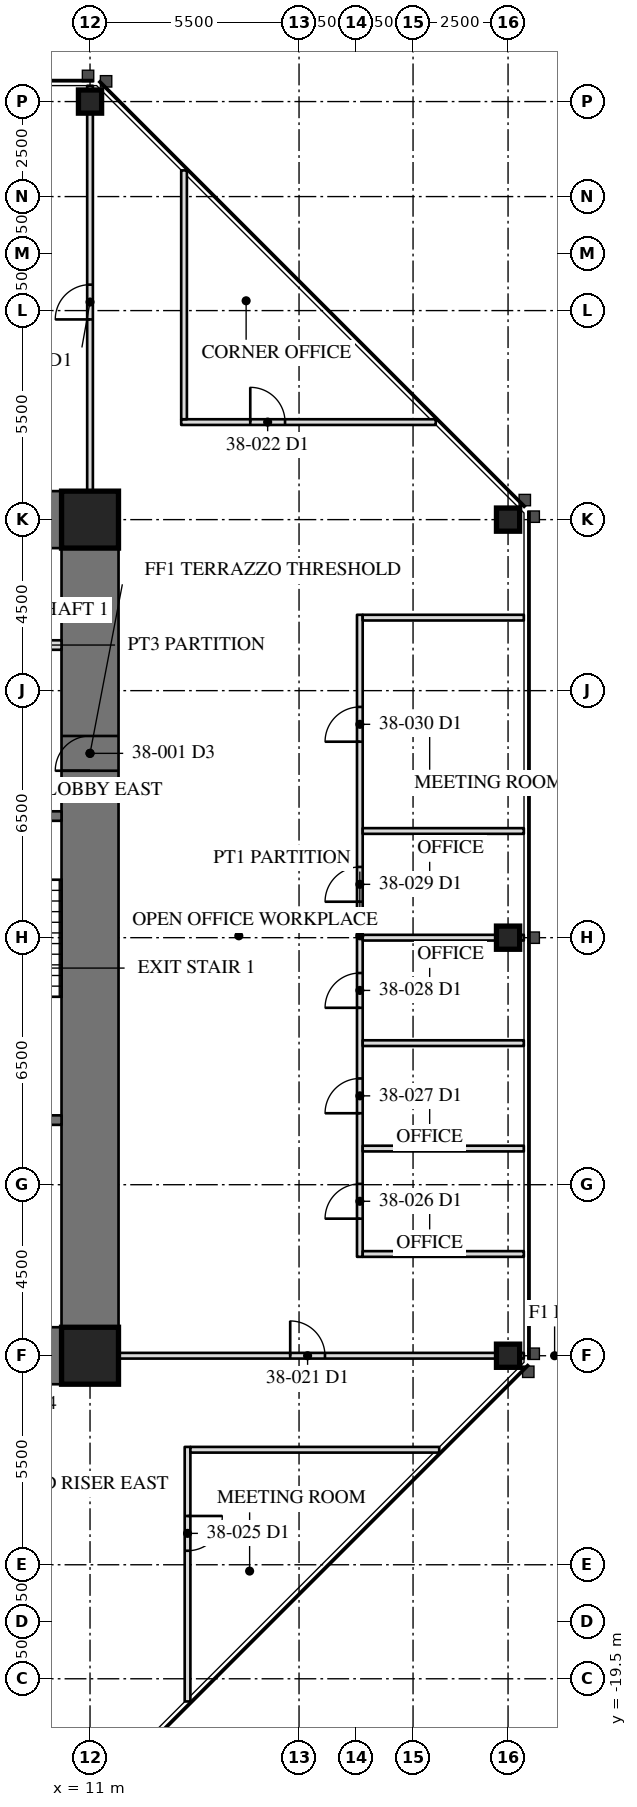
"""IFC4 building model, lengths in metres.
Left out: names, types, materials, properties, quantities, classifications, styles, units other than length and angle.
Written with IfcOpenShell. Run it as: python <this file> out.ifc"""

import sys

from ifc_helpers import new_model, si_unit, direction, frame, frame_2d, origin, origin_2d, place, context, subcontext, project, spatial, rectangle, hollow_rectangle, extrude, element, fill, save


model = new_model("IFC4")
c1 = context("Model", 3, precision=1e-05, world=origin(), true_north=direction((0.0, 1.0)))
c2 = subcontext(c1, "Body", "Model", "MODEL_VIEW")
j1 = project(units=[si_unit("LENGTHUNIT", "METRE"), si_unit("PLANEANGLEUNIT", "RADIAN")], contexts=[c1])
p1 = place(None, origin())
s1 = spatial("IfcSite", under=j1, at=p1, CompositionType="ELEMENT")
p2 = place(p1, origin())
s2 = spatial("IfcBuilding", under=s1, at=p2, CompositionType="ELEMENT")
p3 = place(p2, frame((0.0, 0.0, 162.3)))
s3 = spatial("IfcBuildingStorey", under=s2, at=p3, CompositionType="ELEMENT", Elevation=162.3)
for number, where, z_axis, x_axis in (
    (1, (22.0, -11.0, 0.0), (0.0, 0.0, 1.0), (0.0, 1.0, 0.0)),
    (2, (22.0, 0.0, 0.0), (0.0, 0.0, 1.0), (0.0, 1.0, 0.0)),
    (3, (22.0, 11.0, 0.0), (0.0, 0.0, 1.0), (0.0, 1.0, 0.0)),
    (4, (11.0, 22.0, 0.0), (0.0, 0.0, 1.0), (1.0, 0.0, 0.0)),
):
    element("IfcColumn", number, at=place(p3, frame(where, z_axis=z_axis, x_axis=x_axis)), inside=s3, PredefinedType="COLUMN", context=c2, shape_type="SweptSolid", body=[
        extrude(hollow_rectangle(XDim=0.61, YDim=0.61, WallThickness=0.076, at=origin_2d()), origin(), (0.0, 0.0, 1.0), 4.1),
    ])
p4 = place(p3, frame((11.0, -11.0, 0.0), z_axis=(0.0, 0.0, 1.0), x_axis=(0.0, 1.0, 0.0)))
e5 = element("IfcWall", 5, at=p4, inside=s3, PredefinedType="SHEAR", context=c2, shape_type="SweptSolid", body=[
    extrude(rectangle(XDim=22.0, YDim=1.5, at=frame_2d((11.0, 0.0))), origin(), (0.0, 0.0, 1.0), 4.1),
])
p5 = place(p4, frame((15.393, 0.0, 0.0)))
e6 = element("IfcOpeningElement", 6, at=p5, cuts=e5, PredefinedType="OPENING", context=c2, shape_type="SweptSolid", body=[
    extrude(rectangle(XDim=0.915, YDim=2.134, at=frame_2d((0.458, 1.067))), frame((0.0, 0.76, 0.0), z_axis=(0.0, -1.0, 0.0), x_axis=(1.0, 0.0, 0.0)), (0.0, 0.0, 1.0), 1.52),
])
for number, where, z_axis, x_axis in (
    (7, (11.0, 11.0, 0.0), (0.0, 0.0, 1.0), (-1.0, 0.0, 0.0)),
    (8, (6.5, -11.0, 0.0), (0.0, 0.0, 1.0), (1.0, 0.0, 0.0)),
):
    element("IfcWall", number, at=place(p3, frame(where, z_axis=z_axis, x_axis=x_axis)), inside=s3, PredefinedType="SHEAR", context=c2, shape_type="SweptSolid", body=[
        extrude(rectangle(XDim=4.5, YDim=1.5, at=frame_2d((2.25, 0.0))), origin(), (0.0, 0.0, 1.0), 4.1),
    ])
for number, where, z_axis, x_axis in (
    (9, (11.0, 11.0, 0.0), (0.0, 0.0, 1.0), (1.0, 0.0, 0.0)),
    (10, (11.0, -11.0, 0.0), (0.0, 0.0, 1.0), (1.0, 0.0, 0.0)),
):
    element("IfcColumn", number, at=place(p3, frame(where, z_axis=z_axis, x_axis=x_axis)), inside=s3, PredefinedType="COLUMN", context=c2, shape_type="SweptSolid", body=[
        extrude(hollow_rectangle(XDim=1.499, YDim=1.499, WallThickness=0.102, at=origin_2d()), origin(), (0.0, 0.0, 1.0), 4.1),
    ])
p6 = place(p3, frame((6.95, -4.8, 0.0), z_axis=(0.0, 0.0, 1.0), x_axis=(1.0, 0.0, 0.0)))
e11 = element("IfcWall", 11, at=p6, inside=s3, PredefinedType="SOLIDWALL", context=c2, shape_type="SweptSolid", body=[
    extrude(rectangle(XDim=3.3, YDim=0.25, at=frame_2d((1.65, 0.0))), origin(), (0.0, 0.0, 1.0), 3.91),
])
p7 = place(p3, frame((6.95, 3.2, 0.0), z_axis=(0.0, 0.0, 1.0), x_axis=(1.0, 0.0, 0.0)))
e12 = element("IfcWall", 12, at=p7, inside=s3, PredefinedType="SOLIDWALL", context=c2, shape_type="SweptSolid", body=[
    extrude(rectangle(XDim=3.3, YDim=0.25, at=frame_2d((1.65, 0.0))), origin(), (0.0, 0.0, 1.0), 3.91),
])
p8 = place(p7, frame((1.116, 0.0, 0.0)))
e13 = element("IfcOpeningElement", 13, at=p8, cuts=e12, PredefinedType="OPENING", context=c2, shape_type="SweptSolid", body=[
    extrude(rectangle(XDim=1.067, YDim=2.134, at=frame_2d((0.533, 1.067))), frame((0.0, 0.135, 0.0), z_axis=(0.0, -1.0, 0.0), x_axis=(1.0, 0.0, 0.0)), (0.0, 0.0, 1.0), 0.27),
])
p9 = place(p3, frame((6.95, 7.7, 0.0), z_axis=(0.0, 0.0, 1.0), x_axis=(1.0, 0.0, 0.0)))
e14 = element("IfcWall", 14, at=p9, inside=s3, PredefinedType="PARTITIONING", context=c2, shape_type="SweptSolid", body=[
    extrude(rectangle(XDim=3.3, YDim=0.25, at=frame_2d((1.65, 0.0))), origin(), (0.0, 0.0, 1.0), 3.91),
])
p10 = place(p9, frame((0.45, 0.0, 0.0)))
e15 = element("IfcOpeningElement", 15, at=p10, cuts=e14, PredefinedType="OPENING", context=c2, shape_type="SweptSolid", body=[
    extrude(rectangle(XDim=1.219, YDim=2.134, at=frame_2d((0.609, 1.067))), frame((0.0, 0.135, 0.0), z_axis=(0.0, -1.0, 0.0), x_axis=(1.0, 0.0, 0.0)), (0.0, 0.0, 1.0), 0.27),
])
p11 = place(p3, frame((11.0, 11.75, 0.0), z_axis=(0.0, 0.0, 1.0), x_axis=(0.0, 1.0, 0.0)))
e16 = element("IfcWall", 16, at=p11, inside=s3, PredefinedType="PARTITIONING", context=c2, shape_type="SweptSolid", body=[
    extrude(rectangle(XDim=10.665, YDim=0.15, at=frame_2d((5.333, 0.0))), origin(), (0.0, 0.0, 1.0), 3.326),
])
p12 = place(p11, frame((4.518, 0.0, 0.0)))
e17 = element("IfcOpeningElement", 17, at=p12, cuts=e16, PredefinedType="OPENING", context=c2, shape_type="SweptSolid", body=[
    extrude(rectangle(XDim=0.915, YDim=2.134, at=frame_2d((0.458, 1.067))), frame((0.0, 0.085, 0.0), z_axis=(0.0, -1.0, 0.0), x_axis=(1.0, 0.0, 0.0)), (0.0, 0.0, 1.0), 0.17),
])
p13 = place(p3, frame((11.75, -11.0, 0.0), z_axis=(0.0, 0.0, 1.0), x_axis=(1.0, 0.0, 0.0)))
e18 = element("IfcWall", 18, at=p13, inside=s3, PredefinedType="PARTITIONING", context=c2, shape_type="SweptSolid", body=[
    extrude(rectangle(XDim=10.665, YDim=0.15, at=frame_2d((5.333, 0.0))), origin(), (0.0, 0.0, 1.0), 3.326),
])
p14 = place(p13, frame((4.518, 0.0, 0.0)))
e19 = element("IfcOpeningElement", 19, at=p14, cuts=e18, PredefinedType="OPENING", context=c2, shape_type="SweptSolid", body=[
    extrude(rectangle(XDim=0.915, YDim=2.134, at=frame_2d((0.458, 1.067))), frame((0.0, 0.085, 0.0), z_axis=(0.0, -1.0, 0.0), x_axis=(1.0, 0.0, 0.0)), (0.0, 0.0, 1.0), 0.17),
])
p15 = place(p3, frame((13.399, 13.566, 0.0), z_axis=(0.0, 0.0, 1.0), x_axis=(1.0, 0.0, 0.0)))
e20 = element("IfcWall", 20, at=p15, inside=s3, PredefinedType="PARTITIONING", context=c2, shape_type="SweptSolid", body=[
    extrude(rectangle(XDim=6.698, YDim=0.15, at=frame_2d((3.349, 0.0))), origin(), (0.0, 0.0, 1.0), 3.91),
])
p16 = place(p15, frame((1.817, 0.0, 0.0)))
e21 = element("IfcOpeningElement", 21, at=p16, cuts=e20, PredefinedType="OPENING", context=c2, shape_type="SweptSolid", body=[
    extrude(rectangle(XDim=0.915, YDim=2.134, at=frame_2d((0.458, 1.067))), frame((0.0, 0.085, 0.0), z_axis=(0.0, -1.0, 0.0), x_axis=(1.0, 0.0, 0.0)), (0.0, 0.0, 1.0), 0.17),
])
p17 = place(p3, frame((13.474, 13.641, 0.0), z_axis=(0.0, 0.0, 1.0), x_axis=(0.0, 1.0, 0.0)))
e22 = element("IfcWall", 22, at=p17, inside=s3, PredefinedType="PARTITIONING", context=c2, shape_type="SweptSolid", body=[
    extrude(rectangle(XDim=6.548, YDim=0.15, at=frame_2d((3.274, 0.0))), origin(), (0.0, 0.0, 1.0), 3.91),
])
p18 = place(p3, frame((13.566, -13.399, 0.0), z_axis=(0.0, 0.0, 1.0), x_axis=(0.0, -1.0, 0.0)))
e23 = element("IfcWall", 23, at=p18, inside=s3, PredefinedType="PARTITIONING", context=c2, shape_type="SweptSolid", body=[
    extrude(rectangle(XDim=6.698, YDim=0.15, at=frame_2d((3.349, 0.0))), origin(), (0.0, 0.0, 1.0), 3.91),
])
p19 = place(p18, frame((1.817, 0.0, 0.0)))
e24 = element("IfcOpeningElement", 24, at=p19, cuts=e23, PredefinedType="OPENING", context=c2, shape_type="SweptSolid", body=[
    extrude(rectangle(XDim=0.915, YDim=2.134, at=frame_2d((0.458, 1.067))), frame((0.0, 0.085, 0.0), z_axis=(0.0, -1.0, 0.0), x_axis=(1.0, 0.0, 0.0)), (0.0, 0.0, 1.0), 0.17),
])
p20 = place(p3, frame((13.641, -13.474, 0.0), z_axis=(0.0, 0.0, 1.0), x_axis=(1.0, 0.0, 0.0)))
e25 = element("IfcWall", 25, at=p20, inside=s3, PredefinedType="PARTITIONING", context=c2, shape_type="SweptSolid", body=[
    extrude(rectangle(XDim=6.548, YDim=0.15, at=frame_2d((3.274, 0.0))), origin(), (0.0, 0.0, 1.0), 3.91),
])
p21 = place(p3, frame((18.1, -8.398, 0.0), z_axis=(0.0, 0.0, 1.0), x_axis=(0.0, 1.0, 0.0)))
e26 = element("IfcWall", 26, at=p21, inside=s3, PredefinedType="PARTITIONING", context=c2, shape_type="SweptSolid", body=[
    extrude(rectangle(XDim=16.894, YDim=0.15, at=frame_2d((8.447, 0.0))), origin(), (0.0, 0.0, 1.0), 3.91),
])
p22 = place(p21, frame((1.004, 0.0, 0.0)))
e27 = element("IfcOpeningElement", 27, at=p22, cuts=e26, PredefinedType="OPENING", context=c2, shape_type="SweptSolid", body=[
    extrude(rectangle(XDim=0.915, YDim=2.134, at=frame_2d((0.458, 1.067))), frame((0.0, 0.085, 0.0), z_axis=(0.0, -1.0, 0.0), x_axis=(1.0, 0.0, 0.0)), (0.0, 0.0, 1.0), 0.17),
])
p23 = place(p21, frame((3.779, 0.0, 0.0)))
e28 = element("IfcOpeningElement", 28, at=p23, cuts=e26, PredefinedType="OPENING", context=c2, shape_type="SweptSolid", body=[
    extrude(rectangle(XDim=0.915, YDim=2.134, at=frame_2d((0.458, 1.067))), frame((0.0, 0.085, 0.0), z_axis=(0.0, -1.0, 0.0), x_axis=(1.0, 0.0, 0.0)), (0.0, 0.0, 1.0), 0.17),
])
p24 = place(p21, frame((6.553, 0.0, 0.0)))
e29 = element("IfcOpeningElement", 29, at=p24, cuts=e26, PredefinedType="OPENING", context=c2, shape_type="SweptSolid", body=[
    extrude(rectangle(XDim=0.915, YDim=2.134, at=frame_2d((0.458, 1.067))), frame((0.0, 0.085, 0.0), z_axis=(0.0, -1.0, 0.0), x_axis=(1.0, 0.0, 0.0)), (0.0, 0.0, 1.0), 0.17),
])
p25 = place(p21, frame((9.344, 0.0, 0.0)))
e30 = element("IfcOpeningElement", 30, at=p25, cuts=e26, PredefinedType="OPENING", context=c2, shape_type="SweptSolid", body=[
    extrude(rectangle(XDim=0.915, YDim=2.134, at=frame_2d((0.458, 1.067))), frame((0.0, 0.085, 0.0), z_axis=(0.0, -1.0, 0.0), x_axis=(1.0, 0.0, 0.0)), (0.0, 0.0, 1.0), 0.17),
])
p26 = place(p21, frame((13.554, 0.0, 0.0)))
e31 = element("IfcOpeningElement", 31, at=p26, cuts=e26, PredefinedType="OPENING", context=c2, shape_type="SweptSolid", body=[
    extrude(rectangle(XDim=0.915, YDim=2.134, at=frame_2d((0.458, 1.067))), frame((0.0, 0.085, 0.0), z_axis=(0.0, -1.0, 0.0), x_axis=(1.0, 0.0, 0.0)), (0.0, 0.0, 1.0), 0.17),
])
for number, where, z_axis, x_axis in (
    (32, (18.175, -8.323, 0.0), (0.0, 0.0, 1.0), (1.0, 0.0, 0.0)),
    (33, (18.175, -5.549, 0.0), (0.0, 0.0, 1.0), (1.0, 0.0, 0.0)),
    (34, (18.175, -2.775, 0.0), (0.0, 0.0, 1.0), (1.0, 0.0, 0.0)),
):
    element("IfcWall", number, at=place(p3, frame(where, z_axis=z_axis, x_axis=x_axis)), inside=s3, PredefinedType="PARTITIONING", context=c2, shape_type="SweptSolid", body=[
        extrude(rectangle(XDim=4.24, YDim=0.15, at=frame_2d((2.12, 0.0))), origin(), (0.0, 0.0, 1.0), 3.91),
    ])
p27 = place(p3, frame((18.175, 0.0, 0.0), z_axis=(0.0, 0.0, 1.0), x_axis=(1.0, 0.0, 0.0)))
e35 = element("IfcWall", 35, at=p27, inside=s3, PredefinedType="PARTITIONING", context=c2, shape_type="SweptSolid", body=[
    extrude(rectangle(XDim=4.24, YDim=0.15, at=frame_2d((2.12, 0.0))), origin(), (0.0, 0.0, 1.0), 3.326),
])
for number, where, z_axis, x_axis in (
    (36, (18.175, 2.807, 0.0), (0.0, 0.0, 1.0), (1.0, 0.0, 0.0)),
    (37, (18.175, 8.421, 0.0), (0.0, 0.0, 1.0), (1.0, 0.0, 0.0)),
):
    element("IfcWall", number, at=place(p3, frame(where, z_axis=z_axis, x_axis=x_axis)), inside=s3, PredefinedType="PARTITIONING", context=c2, shape_type="SweptSolid", body=[
        extrude(rectangle(XDim=4.24, YDim=0.15, at=frame_2d((2.12, 0.0))), origin(), (0.0, 0.0, 1.0), 3.91),
    ])
p28 = place(p5, origin())
e38 = element("IfcDoor", 38, at=p28, inside=s3, OperationType="SINGLE_SWING_RIGHT", PredefinedType="DOOR", context=c2, shape_type="SweptSolid", body=[
    extrude(rectangle(XDim=0.915, YDim=2.134, at=frame_2d((0.458, 1.067))), frame((0.0, -0.675, 0.0), z_axis=(0.0, -1.0, 0.0), x_axis=(1.0, 0.0, 0.0)), (0.0, 0.0, 1.0), 0.05),
])
fill(e6, e38)
p29 = place(p12, origin())
e39 = element("IfcDoor", 39, at=p29, inside=s3, OperationType="SINGLE_SWING_LEFT", PredefinedType="DOOR", context=c2, shape_type="SweptSolid", body=[
    extrude(rectangle(XDim=0.915, YDim=2.134, at=frame_2d((0.458, 1.067))), frame((0.0, 0.025, 0.0), z_axis=(0.0, -1.0, 0.0), x_axis=(1.0, 0.0, 0.0)), (0.0, 0.0, 1.0), 0.05),
])
fill(e17, e39)
p30 = place(p14, origin())
e40 = element("IfcDoor", 40, at=p30, inside=s3, OperationType="SINGLE_SWING_LEFT", PredefinedType="DOOR", context=c2, shape_type="SweptSolid", body=[
    extrude(rectangle(XDim=0.915, YDim=2.134, at=frame_2d((0.458, 1.067))), frame((0.0, 0.025, 0.0), z_axis=(0.0, -1.0, 0.0), x_axis=(1.0, 0.0, 0.0)), (0.0, 0.0, 1.0), 0.05),
])
fill(e19, e40)
p31 = place(p16, origin())
e41 = element("IfcDoor", 41, at=p31, inside=s3, OperationType="SINGLE_SWING_LEFT", PredefinedType="DOOR", context=c2, shape_type="SweptSolid", body=[
    extrude(rectangle(XDim=0.915, YDim=2.134, at=frame_2d((0.458, 1.067))), frame((0.0, 0.025, 0.0), z_axis=(0.0, -1.0, 0.0), x_axis=(1.0, 0.0, 0.0)), (0.0, 0.0, 1.0), 0.05),
])
fill(e21, e41)
p32 = place(p19, origin())
e42 = element("IfcDoor", 42, at=p32, inside=s3, OperationType="SINGLE_SWING_LEFT", PredefinedType="DOOR", context=c2, shape_type="SweptSolid", body=[
    extrude(rectangle(XDim=0.915, YDim=2.134, at=frame_2d((0.458, 1.067))), frame((0.0, 0.025, 0.0), z_axis=(0.0, -1.0, 0.0), x_axis=(1.0, 0.0, 0.0)), (0.0, 0.0, 1.0), 0.05),
])
fill(e24, e42)
p33 = place(p22, origin())
e43 = element("IfcDoor", 43, at=p33, inside=s3, OperationType="SINGLE_SWING_LEFT", PredefinedType="DOOR", context=c2, shape_type="SweptSolid", body=[
    extrude(rectangle(XDim=0.915, YDim=2.134, at=frame_2d((0.458, 1.067))), frame((0.0, 0.025, 0.0), z_axis=(0.0, -1.0, 0.0), x_axis=(1.0, 0.0, 0.0)), (0.0, 0.0, 1.0), 0.05),
])
fill(e27, e43)
p34 = place(p23, origin())
e44 = element("IfcDoor", 44, at=p34, inside=s3, OperationType="SINGLE_SWING_LEFT", PredefinedType="DOOR", context=c2, shape_type="SweptSolid", body=[
    extrude(rectangle(XDim=0.915, YDim=2.134, at=frame_2d((0.458, 1.067))), frame((0.0, 0.025, 0.0), z_axis=(0.0, -1.0, 0.0), x_axis=(1.0, 0.0, 0.0)), (0.0, 0.0, 1.0), 0.05),
])
fill(e28, e44)
p35 = place(p24, origin())
e45 = element("IfcDoor", 45, at=p35, inside=s3, OperationType="SINGLE_SWING_LEFT", PredefinedType="DOOR", context=c2, shape_type="SweptSolid", body=[
    extrude(rectangle(XDim=0.915, YDim=2.134, at=frame_2d((0.458, 1.067))), frame((0.0, 0.025, 0.0), z_axis=(0.0, -1.0, 0.0), x_axis=(1.0, 0.0, 0.0)), (0.0, 0.0, 1.0), 0.05),
])
fill(e29, e45)
p36 = place(p25, origin())
e46 = element("IfcDoor", 46, at=p36, inside=s3, OperationType="SINGLE_SWING_LEFT", PredefinedType="DOOR", context=c2, shape_type="SweptSolid", body=[
    extrude(rectangle(XDim=0.915, YDim=2.134, at=frame_2d((0.458, 1.067))), frame((0.0, 0.025, 0.0), z_axis=(0.0, -1.0, 0.0), x_axis=(1.0, 0.0, 0.0)), (0.0, 0.0, 1.0), 0.05),
])
fill(e30, e46)
p37 = place(p26, origin())
e47 = element("IfcDoor", 47, at=p37, inside=s3, OperationType="SINGLE_SWING_LEFT", PredefinedType="DOOR", context=c2, shape_type="SweptSolid", body=[
    extrude(rectangle(XDim=0.915, YDim=2.134, at=frame_2d((0.458, 1.067))), frame((0.0, 0.025, 0.0), z_axis=(0.0, -1.0, 0.0), x_axis=(1.0, 0.0, 0.0)), (0.0, 0.0, 1.0), 0.05),
])
fill(e31, e47)
save(model, sys.argv[1])
